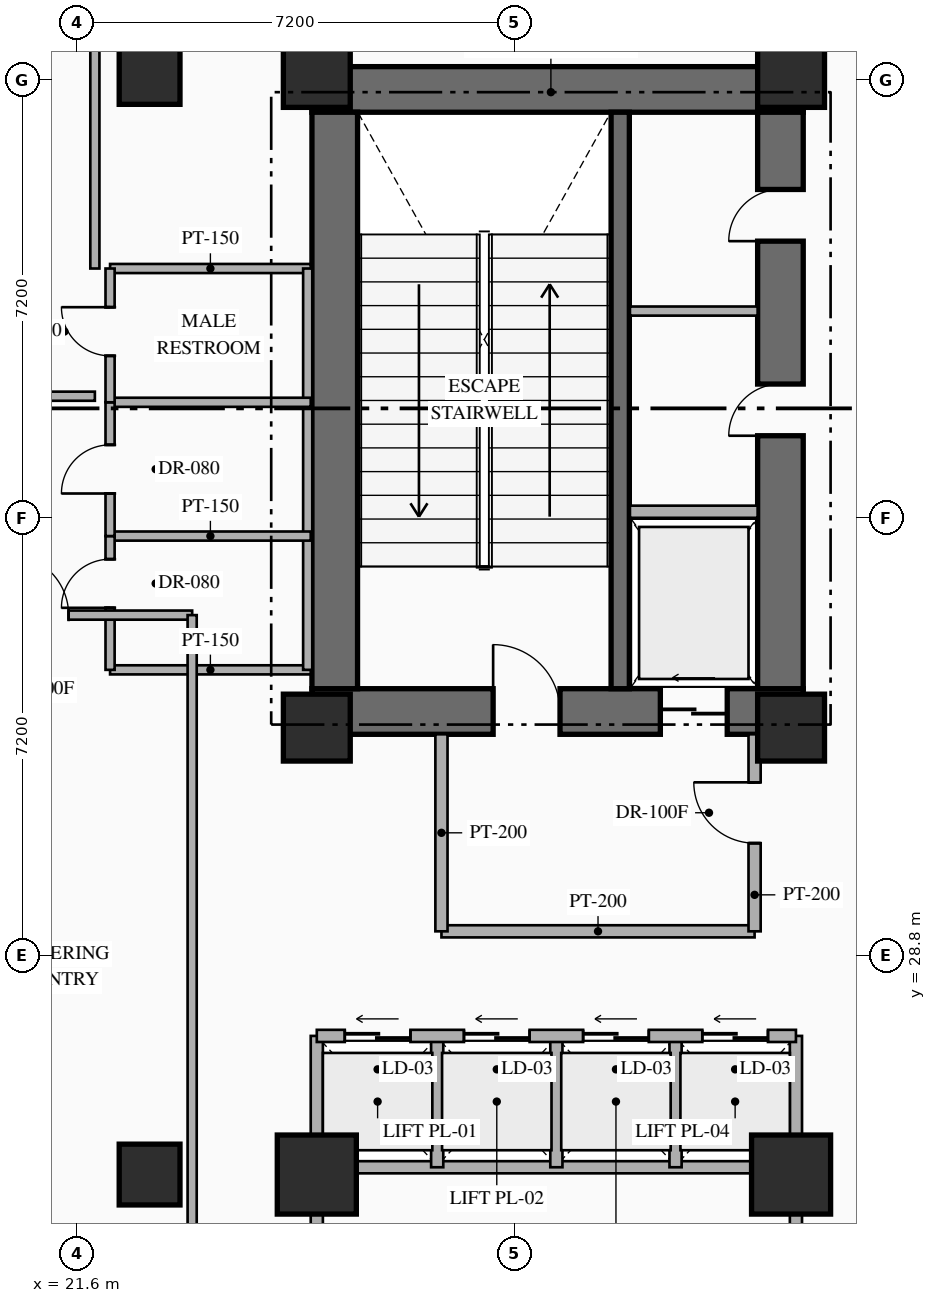
"""IFC4 building model, lengths in metres.
Left out: names, types, materials, properties, quantities, classifications, styles, units other than length and angle.
Written with IfcOpenShell. Run it as: python <this file> out.ifc"""

import sys

from ifc_helpers import new_model, si_unit, direction, frame, frame_2d, origin, origin_2d, place, context, subcontext, project, spatial, rectangle, hollow_rectangle, extrude, element, fill, save


model = new_model("IFC4")
c1 = context("Model", 3, precision=1e-05, world=origin(), true_north=direction((0.0, 1.0)))
c2 = subcontext(c1, "Body", "Model", "MODEL_VIEW")
j1 = project(units=[si_unit("LENGTHUNIT", "METRE"), si_unit("PLANEANGLEUNIT", "RADIAN")], contexts=[c1])
p1 = place(None, origin())
s1 = spatial("IfcSite", under=j1, at=p1, CompositionType="ELEMENT")
p2 = place(p1, origin())
s2 = spatial("IfcBuilding", under=s1, at=p2, CompositionType="ELEMENT")
p3 = place(p2, frame((0.0, 0.0, 5.4)))
s3 = spatial("IfcBuildingStorey", under=s2, at=p3, CompositionType="ELEMENT", Elevation=5.4)
p4 = place(p3, frame((25.47, 32.815, 0.0), z_axis=(0.0, 0.0, 1.0), x_axis=(1.0, 0.0, 0.0)))
e1 = element("IfcWall", 1, at=p4, inside=s3, PredefinedType="SHEAR", context=c2, shape_type="SweptSolid", body=[
    extrude(rectangle(XDim=8.08, YDim=0.75, at=frame_2d((4.04, 0.0))), origin(), (0.0, 0.0, 1.0), 5.4),
])
p5 = place(p4, frame((2.98, 0.0, 0.0)))
e2 = element("IfcOpeningElement", 2, at=p5, cuts=e1, PredefinedType="OPENING", context=c2, shape_type="SweptSolid", body=[
    extrude(rectangle(XDim=1.1, YDim=2.2, at=frame_2d((0.55, 1.1))), frame((0.0, 0.385, 0.0), z_axis=(0.0, -1.0, 0.0), x_axis=(1.0, 0.0, 0.0)), (0.0, 0.0, 1.0), 0.77),
])
p6 = place(p4, frame((5.73, 0.0, 0.0)))
e3 = element("IfcOpeningElement", 3, at=p6, cuts=e1, PredefinedType="OPENING", context=c2, shape_type="SweptSolid", body=[
    extrude(rectangle(XDim=1.1, YDim=2.15, at=frame_2d((0.55, 1.075))), frame((0.0, 0.385, 0.0), z_axis=(0.0, -1.0, 0.0), x_axis=(1.0, 0.0, 0.0)), (0.0, 0.0, 1.0), 0.77),
])
p7 = place(p3, frame((25.47, 43.045, 0.0), z_axis=(0.0, 0.0, 1.0), x_axis=(1.0, 0.0, 0.0)))
e4 = element("IfcWall", 4, at=p7, inside=s3, PredefinedType="SHEAR", context=c2, shape_type="SweptSolid", body=[
    extrude(rectangle(XDim=8.08, YDim=0.75, at=frame_2d((4.04, 0.0))), origin(), (0.0, 0.0, 1.0), 5.4),
])
p8 = place(p3, frame((25.845, 33.19, 0.0), z_axis=(0.0, 0.0, 1.0), x_axis=(0.0, 1.0, 0.0)))
e5 = element("IfcWall", 5, at=p8, inside=s3, PredefinedType="SHEAR", context=c2, shape_type="SweptSolid", body=[
    extrude(rectangle(XDim=9.48, YDim=0.75, at=frame_2d((4.74, 0.0))), origin(), (0.0, 0.0, 1.0), 5.4),
])
p9 = place(p3, frame((33.175, 33.19, 0.0), z_axis=(0.0, 0.0, 1.0), x_axis=(0.0, 1.0, 0.0)))
e6 = element("IfcWall", 6, at=p9, inside=s3, PredefinedType="SHEAR", context=c2, shape_type="SweptSolid", body=[
    extrude(rectangle(XDim=9.48, YDim=0.75, at=frame_2d((4.74, 0.0))), origin(), (0.0, 0.0, 1.0), 5.4),
])
p10 = place(p9, frame((4.16, 0.0, 0.0)))
e7 = element("IfcOpeningElement", 7, at=p10, cuts=e6, PredefinedType="OPENING", context=c2, shape_type="SweptSolid", body=[
    extrude(rectangle(XDim=0.85, YDim=2.08, at=frame_2d((0.425, 1.04))), frame((0.0, 0.385, 0.0), z_axis=(0.0, -1.0, 0.0), x_axis=(1.0, 0.0, 0.0)), (0.0, 0.0, 1.0), 0.77),
])
p11 = place(p9, frame((7.36, 0.0, 0.0)))
e8 = element("IfcOpeningElement", 8, at=p11, cuts=e6, PredefinedType="OPENING", context=c2, shape_type="SweptSolid", body=[
    extrude(rectangle(XDim=0.85, YDim=2.08, at=frame_2d((0.425, 1.04))), frame((0.0, 0.385, 0.0), z_axis=(0.0, -1.0, 0.0), x_axis=(1.0, 0.0, 0.0)), (0.0, 0.0, 1.0), 0.77),
])
p12 = place(p3, frame((30.54, 33.19, 0.0), z_axis=(0.0, 0.0, 1.0), x_axis=(0.0, 1.0, 0.0)))
e9 = element("IfcWall", 9, at=p12, inside=s3, PredefinedType="SHEAR", context=c2, shape_type="SweptSolid", body=[
    extrude(rectangle(XDim=9.48, YDim=0.3, at=frame_2d((4.74, 0.0))), origin(), (0.0, 0.0, 1.0), 5.4),
])
for number, where, z_axis, x_axis in (
    (10, (25.55, 32.55, 0.0), (0.0, 0.0, 1.0), (1.0, 0.0, 0.0)),
    (11, (33.35, 32.55, 0.0), (0.0, 0.0, 1.0), (1.0, 0.0, 0.0)),
    (12, (25.55, 43.3, 0.0), (0.0, 0.0, 1.0), (1.0, 0.0, 0.0)),
    (13, (33.35, 43.3, 0.0), (0.0, 0.0, 1.0), (1.0, 0.0, 0.0)),
):
    element("IfcColumn", number, at=place(p3, frame(where, z_axis=z_axis, x_axis=x_axis)), inside=s3, PredefinedType="COLUMN", context=c2, shape_type="SweptSolid", body=[
        extrude(rectangle(XDim=1.1, YDim=1.1, at=origin_2d()), origin(), (0.0, 0.0, 1.0), 5.4),
    ])
for number, where, z_axis, x_axis in (
    (14, (25.55, 25.2, 0.0), (0.0, 0.0, 1.0), (1.0, 0.0, 0.0)),
    (15, (33.35, 25.2, 0.0), (0.0, 0.0, 1.0), (1.0, 0.0, 0.0)),
):
    element("IfcColumn", number, at=place(p3, frame(where, z_axis=z_axis, x_axis=x_axis)), inside=s3, PredefinedType="COLUMN", context=c2, shape_type="SweptSolid", body=[
        extrude(rectangle(XDim=1.3, YDim=1.3, at=origin_2d()), origin(), (0.0, 0.0, 1.0), 5.4),
    ])
for number, where, z_axis, x_axis in (
    (16, (22.8, 25.2, 0.0), (0.0, 0.0, 1.0), (1.0, 0.0, 0.0)),
    (17, (22.8, 43.3, 0.0), (0.0, 0.0, 1.0), (1.0, 0.0, 0.0)),
):
    element("IfcColumn", number, at=place(p3, frame(where, z_axis=z_axis, x_axis=x_axis)), inside=s3, PredefinedType="COLUMN", context=c2, shape_type="SweptSolid", body=[
        extrude(hollow_rectangle(XDim=1.0, YDim=1.0, WallThickness=0.038, at=origin_2d()), origin(), (0.0, 0.0, 1.0), 5.4),
    ])
p13 = place(p3, frame((30.7, 36.1, 0.0), z_axis=(0.0, 0.0, 1.0), x_axis=(1.0, 0.0, 0.0)))
e18 = element("IfcWall", 18, at=p13, inside=s3, PredefinedType="STANDARD", context=c2, shape_type="SweptSolid", body=[
    extrude(rectangle(XDim=2.1, YDim=0.2, at=frame_2d((1.05, 0.0))), origin(), (0.0, 0.0, 1.0), 5.1),
])
p14 = place(p3, frame((30.7, 39.4, 0.0), z_axis=(0.0, 0.0, 1.0), x_axis=(1.0, 0.0, 0.0)))
e19 = element("IfcWall", 19, at=p14, inside=s3, PredefinedType="PARTITIONING", context=c2, shape_type="SweptSolid", body=[
    extrude(rectangle(XDim=2.1, YDim=0.15, at=frame_2d((1.05, 0.0))), origin(), (0.0, 0.0, 1.0), 5.1),
])
p15 = place(p3, frame((27.6, 29.2, 0.0), z_axis=(0.0, 0.0, 1.0), x_axis=(1.0, 0.0, 0.0)))
e20 = element("IfcWall", 20, at=p15, inside=s3, PredefinedType="STANDARD", context=c2, shape_type="SweptSolid", body=[
    extrude(rectangle(XDim=5.15, YDim=0.2, at=frame_2d((2.575, 0.0))), origin(), (0.0, 0.0, 1.0), 5.1),
])
p16 = place(p3, frame((27.6, 29.2, 0.0), z_axis=(0.0, 0.0, 1.0), x_axis=(0.0, 1.0, 0.0)))
e21 = element("IfcWall", 21, at=p16, inside=s3, PredefinedType="STANDARD", context=c2, shape_type="SweptSolid", body=[
    extrude(rectangle(XDim=3.24, YDim=0.2, at=frame_2d((1.62, 0.0))), origin(), (0.0, 0.0, 1.0), 5.1),
])
p17 = place(p3, frame((32.75, 29.2, 0.0), z_axis=(0.0, 0.0, 1.0), x_axis=(0.0, 1.0, 0.0)))
e22 = element("IfcWall", 22, at=p17, inside=s3, PredefinedType="STANDARD", context=c2, shape_type="SweptSolid", body=[
    extrude(rectangle(XDim=3.24, YDim=0.2, at=frame_2d((1.62, 0.0))), origin(), (0.0, 0.0, 1.0), 5.1),
])
p18 = place(p17, frame((1.45, 0.0, 0.0)))
e23 = element("IfcOpeningElement", 23, at=p18, cuts=e22, PredefinedType="OPENING", context=c2, shape_type="SweptSolid", body=[
    extrude(rectangle(XDim=1.0, YDim=2.2, at=frame_2d((0.5, 1.1))), frame((0.0, 0.11, 0.0), z_axis=(0.0, -1.0, 0.0), x_axis=(1.0, 0.0, 0.0)), (0.0, 0.0, 1.0), 0.22),
])
for number, where, z_axis, x_axis in (
    (24, (25.55, 23.4, 0.0), (0.0, 0.0, 1.0), (0.0, 1.0, 0.0)),
    (25, (33.43, 23.4, 0.0), (0.0, 0.0, 1.0), (0.0, 1.0, 0.0)),
):
    element("IfcWall", number, at=place(p3, frame(where, z_axis=z_axis, x_axis=x_axis)), inside=s3, PredefinedType="STANDARD", context=c2, shape_type="SweptSolid", body=[
        extrude(rectangle(XDim=4.08, YDim=0.2, at=frame_2d((2.04, 0.0))), origin(), (0.0, 0.0, 1.0), 3.895),
    ])
p19 = place(p3, frame((25.55, 25.32, 0.0), z_axis=(0.0, 0.0, 1.0), x_axis=(1.0, 0.0, 0.0)))
e26 = element("IfcWall", 26, at=p19, inside=s3, PredefinedType="STANDARD", context=c2, shape_type="SweptSolid", body=[
    extrude(rectangle(XDim=7.88, YDim=0.2, at=frame_2d((3.94, 0.0))), origin(), (0.0, 0.0, 1.0), 4.495),
])
for number, where, z_axis, x_axis in (
    (27, (27.53, 25.32, 0.0), (0.0, 0.0, 1.0), (0.0, 1.0, 0.0)),
    (28, (29.49, 25.32, 0.0), (0.0, 0.0, 1.0), (0.0, 1.0, 0.0)),
    (29, (31.45, 25.32, 0.0), (0.0, 0.0, 1.0), (0.0, 1.0, 0.0)),
):
    element("IfcWall", number, at=place(p3, frame(where, z_axis=z_axis, x_axis=x_axis)), inside=s3, PredefinedType="STANDARD", context=c2, shape_type="SweptSolid", body=[
        extrude(rectangle(XDim=2.16, YDim=0.2, at=frame_2d((1.08, 0.0))), origin(), (0.0, 0.0, 1.0), 5.1),
    ])
p20 = place(p3, frame((25.55, 27.48, 0.0), z_axis=(0.0, 0.0, 1.0), x_axis=(1.0, 0.0, 0.0)))
e30 = element("IfcWall", 30, at=p20, inside=s3, PredefinedType="STANDARD", context=c2, shape_type="SweptSolid", body=[
    extrude(rectangle(XDim=7.88, YDim=0.2, at=frame_2d((3.94, 0.0))), origin(), (0.0, 0.0, 1.0), 5.1),
])
p21 = place(p20, frame((0.46, 0.0, 0.0)))
e31 = element("IfcOpeningElement", 31, at=p21, cuts=e30, PredefinedType="OPENING", context=c2, shape_type="SweptSolid", body=[
    extrude(rectangle(XDim=1.08, YDim=2.15, at=frame_2d((0.54, 1.075))), frame((0.0, 0.11, 0.0), z_axis=(0.0, -1.0, 0.0), x_axis=(1.0, 0.0, 0.0)), (0.0, 0.0, 1.0), 0.22),
])
p22 = place(p20, frame((2.42, 0.0, 0.0)))
e32 = element("IfcOpeningElement", 32, at=p22, cuts=e30, PredefinedType="OPENING", context=c2, shape_type="SweptSolid", body=[
    extrude(rectangle(XDim=1.08, YDim=2.15, at=frame_2d((0.54, 1.075))), frame((0.0, 0.11, 0.0), z_axis=(0.0, -1.0, 0.0), x_axis=(1.0, 0.0, 0.0)), (0.0, 0.0, 1.0), 0.22),
])
p23 = place(p20, frame((4.38, 0.0, 0.0)))
e33 = element("IfcOpeningElement", 33, at=p23, cuts=e30, PredefinedType="OPENING", context=c2, shape_type="SweptSolid", body=[
    extrude(rectangle(XDim=1.08, YDim=2.15, at=frame_2d((0.54, 1.075))), frame((0.0, 0.11, 0.0), z_axis=(0.0, -1.0, 0.0), x_axis=(1.0, 0.0, 0.0)), (0.0, 0.0, 1.0), 0.22),
])
p24 = place(p20, frame((6.34, 0.0, 0.0)))
e34 = element("IfcOpeningElement", 34, at=p24, cuts=e30, PredefinedType="OPENING", context=c2, shape_type="SweptSolid", body=[
    extrude(rectangle(XDim=1.08, YDim=2.15, at=frame_2d((0.54, 1.075))), frame((0.0, 0.11, 0.0), z_axis=(0.0, -1.0, 0.0), x_axis=(1.0, 0.0, 0.0)), (0.0, 0.0, 1.0), 0.22),
])
for number, where, z_axis, x_axis in (
    (35, (22.15, 33.5, 0.0), (0.0, 0.0, 1.0), (1.0, 0.0, 0.0)),
    (36, (22.15, 40.1, 0.0), (0.0, 0.0, 1.0), (1.0, 0.0, 0.0)),
):
    element("IfcWall", number, at=place(p3, frame(where, z_axis=z_axis, x_axis=x_axis)), inside=s3, PredefinedType="PARTITIONING", context=c2, shape_type="SweptSolid", body=[
        extrude(rectangle(XDim=3.3, YDim=0.15, at=frame_2d((1.65, 0.0))), origin(), (0.0, 0.0, 1.0), 5.1),
    ])
p25 = place(p3, frame((25.4, 33.5, 0.0), z_axis=(0.0, 0.0, 1.0), x_axis=(0.0, 1.0, 0.0)))
e37 = element("IfcWall", 37, at=p25, inside=s3, PredefinedType="PARTITIONING", context=c2, shape_type="SweptSolid", body=[
    extrude(rectangle(XDim=6.6, YDim=0.15, at=frame_2d((3.3, 0.0))), origin(), (0.0, 0.0, 1.0), 5.1),
])
for number, where, z_axis, x_axis in (
    (38, (22.15, 35.7, 0.0), (0.0, 0.0, 1.0), (1.0, 0.0, 0.0)),
    (39, (22.15, 37.9, 0.0), (0.0, 0.0, 1.0), (1.0, 0.0, 0.0)),
):
    element("IfcWall", number, at=place(p3, frame(where, z_axis=z_axis, x_axis=x_axis)), inside=s3, PredefinedType="PARTITIONING", context=c2, shape_type="SweptSolid", body=[
        extrude(rectangle(XDim=3.3, YDim=0.15, at=frame_2d((1.65, 0.0))), origin(), (0.0, 0.0, 1.0), 5.1),
    ])
p26 = place(p3, frame((22.15, 33.5, 0.0), z_axis=(0.0, 0.0, 1.0), x_axis=(0.0, 1.0, 0.0)))
e40 = element("IfcWall", 40, at=p26, inside=s3, PredefinedType="PARTITIONING", context=c2, shape_type="SweptSolid", body=[
    extrude(rectangle(XDim=2.2, YDim=0.15, at=frame_2d((1.1, 0.0))), origin(), (0.0, 0.0, 1.0), 5.1),
])
p27 = place(p26, frame((1.02, 0.0, 0.0)))
e41 = element("IfcOpeningElement", 41, at=p27, cuts=e40, PredefinedType="OPENING", context=c2, shape_type="SweptSolid", body=[
    extrude(rectangle(XDim=0.8, YDim=2.06, at=frame_2d((0.4, 1.03))), frame((0.0, 0.085, 0.0), z_axis=(0.0, -1.0, 0.0), x_axis=(1.0, 0.0, 0.0)), (0.0, 0.0, 1.0), 0.17),
])
p28 = place(p3, frame((22.15, 35.7, 0.0), z_axis=(0.0, 0.0, 1.0), x_axis=(0.0, 1.0, 0.0)))
e42 = element("IfcWall", 42, at=p28, inside=s3, PredefinedType="PARTITIONING", context=c2, shape_type="SweptSolid", body=[
    extrude(rectangle(XDim=2.2, YDim=0.15, at=frame_2d((1.1, 0.0))), origin(), (0.0, 0.0, 1.0), 5.1),
])
p29 = place(p28, frame((0.7, 0.0, 0.0)))
e43 = element("IfcOpeningElement", 43, at=p29, cuts=e42, PredefinedType="OPENING", context=c2, shape_type="SweptSolid", body=[
    extrude(rectangle(XDim=0.8, YDim=2.06, at=frame_2d((0.4, 1.03))), frame((0.0, 0.085, 0.0), z_axis=(0.0, -1.0, 0.0), x_axis=(1.0, 0.0, 0.0)), (0.0, 0.0, 1.0), 0.17),
])
p30 = place(p3, frame((22.15, 37.9, 0.0), z_axis=(0.0, 0.0, 1.0), x_axis=(0.0, 1.0, 0.0)))
e44 = element("IfcWall", 44, at=p30, inside=s3, PredefinedType="PARTITIONING", context=c2, shape_type="SweptSolid", body=[
    extrude(rectangle(XDim=2.2, YDim=0.15, at=frame_2d((1.1, 0.0))), origin(), (0.0, 0.0, 1.0), 5.1),
])
p31 = place(p30, frame((0.764, 0.0, 0.0)))
e45 = element("IfcOpeningElement", 45, at=p31, cuts=e44, PredefinedType="OPENING", context=c2, shape_type="SweptSolid", body=[
    extrude(rectangle(XDim=0.8, YDim=2.06, at=frame_2d((0.4, 1.03))), frame((0.0, 0.085, 0.0), z_axis=(0.0, -1.0, 0.0), x_axis=(1.0, 0.0, 0.0)), (0.0, 0.0, 1.0), 0.17),
])
p32 = place(p3, frame((0.04, 38.0, 0.0), z_axis=(0.0, 0.0, 1.0), x_axis=(1.0, 0.0, 0.0)))
e46 = element("IfcWall", 46, at=p32, inside=s3, PredefinedType="PARTITIONING", context=c2, shape_type="SweptSolid", body=[
    extrude(rectangle(XDim=21.86, YDim=0.15, at=frame_2d((10.93, 0.0))), origin(), (0.0, 0.0, 1.0), 5.1),
])
p33 = place(p32, frame((10.03, 0.0, 0.0)))
e47 = element("IfcOpeningElement", 47, at=p33, cuts=e46, PredefinedType="OPENING", context=c2, shape_type="SweptSolid", body=[
    extrude(rectangle(XDim=1.8, YDim=2.35, at=frame_2d((0.9, 1.175))), frame((0.0, 0.085, 0.0), z_axis=(0.0, -1.0, 0.0), x_axis=(1.0, 0.0, 0.0)), (0.0, 0.0, 1.0), 0.17),
])
p34 = place(p3, frame((21.9, 40.1, 0.0), z_axis=(0.0, 0.0, 1.0), x_axis=(0.0, 1.0, 0.0)))
e48 = element("IfcWall", 48, at=p34, inside=s3, PredefinedType="PARTITIONING", context=c2, shape_type="SweptSolid", body=[
    extrude(rectangle(XDim=11.46, YDim=0.15, at=frame_2d((5.73, 0.0))), origin(), (0.0, 0.0, 1.0), 5.1),
])
p35 = place(p3, frame((19.2, 34.4, 0.0), z_axis=(0.0, 0.0, 1.0), x_axis=(1.0, 0.0, 0.0)))
e49 = element("IfcWall", 49, at=p35, inside=s3, PredefinedType="PARTITIONING", context=c2, shape_type="SweptSolid", body=[
    extrude(rectangle(XDim=4.3, YDim=0.15, at=frame_2d((2.15, 0.0))), origin(), (0.0, 0.0, 1.0), 5.1),
])
p36 = place(p35, frame((1.269, 0.0, 0.0)))
e50 = element("IfcOpeningElement", 50, at=p36, cuts=e49, PredefinedType="OPENING", context=c2, shape_type="SweptSolid", body=[
    extrude(rectangle(XDim=1.0, YDim=2.2, at=frame_2d((0.5, 1.1))), frame((0.0, 0.085, 0.0), z_axis=(0.0, -1.0, 0.0), x_axis=(1.0, 0.0, 0.0)), (0.0, 0.0, 1.0), 0.17),
])
p37 = place(p3, frame((23.5, 23.44, 0.0), z_axis=(0.0, 0.0, 1.0), x_axis=(0.0, 1.0, 0.0)))
e51 = element("IfcWall", 51, at=p37, inside=s3, PredefinedType="PARTITIONING", context=c2, shape_type="SweptSolid", body=[
    extrude(rectangle(XDim=10.96, YDim=0.15, at=frame_2d((5.48, 0.0))), origin(), (0.0, 0.0, 1.0), 5.1),
])
p38 = place(p3, frame((33.384, 17.312, 0.0), z_axis=(0.0, 0.0, 1.0), x_axis=(0.600008743659, 0.799993442181, 0.0)))
e52 = element("IfcWall", 52, at=p38, inside=s3, PredefinedType="PARTITIONING", context=c2, shape_type="SweptSolid", body=[
    extrude(rectangle(XDim=8.935, YDim=0.15, at=frame_2d((4.468, 0.0))), origin(), (0.0, 0.0, 1.0), 5.1),
])
p39 = place(p5, origin())
e53 = element("IfcDoor", 53, at=p39, inside=s3, OperationType="SINGLE_SWING_LEFT", PredefinedType="DOOR", context=c2, shape_type="SweptSolid", body=[
    extrude(rectangle(XDim=1.1, YDim=2.2, at=frame_2d((0.55, 1.1))), frame((0.0, 0.025, 0.0), z_axis=(0.0, -1.0, 0.0), x_axis=(1.0, 0.0, 0.0)), (0.0, 0.0, 1.0), 0.05),
])
fill(e2, e53)
p40 = place(p6, origin())
e54 = element("IfcDoor", 54, at=p40, inside=s3, OperationType="SLIDING_TO_LEFT", PredefinedType="USERDEFINED", context=c2, shape_type="SweptSolid", body=[
    extrude(rectangle(XDim=1.1, YDim=2.15, at=frame_2d((0.55, 1.075))), frame((0.0, 0.025, 0.0), z_axis=(0.0, -1.0, 0.0), x_axis=(1.0, 0.0, 0.0)), (0.0, 0.0, 1.0), 0.05),
])
fill(e3, e54)
p41 = place(p10, origin())
e55 = element("IfcDoor", 55, at=p41, inside=s3, OperationType="SINGLE_SWING_LEFT", PredefinedType="DOOR", context=c2, shape_type="SweptSolid", body=[
    extrude(rectangle(XDim=0.85, YDim=2.08, at=frame_2d((0.425, 1.04))), frame((0.0, 0.025, 0.0), z_axis=(0.0, -1.0, 0.0), x_axis=(1.0, 0.0, 0.0)), (0.0, 0.0, 1.0), 0.05),
])
fill(e7, e55)
p42 = place(p11, origin())
e56 = element("IfcDoor", 56, at=p42, inside=s3, OperationType="SINGLE_SWING_LEFT", PredefinedType="DOOR", context=c2, shape_type="SweptSolid", body=[
    extrude(rectangle(XDim=0.85, YDim=2.08, at=frame_2d((0.425, 1.04))), frame((0.0, 0.025, 0.0), z_axis=(0.0, -1.0, 0.0), x_axis=(1.0, 0.0, 0.0)), (0.0, 0.0, 1.0), 0.05),
])
fill(e8, e56)
p43 = place(p18, origin())
e57 = element("IfcDoor", 57, at=p43, inside=s3, OperationType="SINGLE_SWING_RIGHT", PredefinedType="DOOR", context=c2, shape_type="SweptSolid", body=[
    extrude(rectangle(XDim=1.0, YDim=2.2, at=frame_2d((0.5, 1.1))), frame((0.0, 0.025, 0.0), z_axis=(0.0, -1.0, 0.0), x_axis=(1.0, 0.0, 0.0)), (0.0, 0.0, 1.0), 0.05),
])
fill(e23, e57)
p44 = place(p21, origin())
e58 = element("IfcDoor", 58, at=p44, inside=s3, OperationType="SLIDING_TO_LEFT", PredefinedType="USERDEFINED", context=c2, shape_type="SweptSolid", body=[
    extrude(rectangle(XDim=1.08, YDim=2.15, at=frame_2d((0.54, 1.075))), frame((0.0, 0.025, 0.0), z_axis=(0.0, -1.0, 0.0), x_axis=(1.0, 0.0, 0.0)), (0.0, 0.0, 1.0), 0.05),
])
fill(e31, e58)
p45 = place(p22, origin())
e59 = element("IfcDoor", 59, at=p45, inside=s3, OperationType="SLIDING_TO_LEFT", PredefinedType="USERDEFINED", context=c2, shape_type="SweptSolid", body=[
    extrude(rectangle(XDim=1.08, YDim=2.15, at=frame_2d((0.54, 1.075))), frame((0.0, 0.025, 0.0), z_axis=(0.0, -1.0, 0.0), x_axis=(1.0, 0.0, 0.0)), (0.0, 0.0, 1.0), 0.05),
])
fill(e32, e59)
p46 = place(p23, origin())
e60 = element("IfcDoor", 60, at=p46, inside=s3, OperationType="SLIDING_TO_LEFT", PredefinedType="USERDEFINED", context=c2, shape_type="SweptSolid", body=[
    extrude(rectangle(XDim=1.08, YDim=2.15, at=frame_2d((0.54, 1.075))), frame((0.0, 0.025, 0.0), z_axis=(0.0, -1.0, 0.0), x_axis=(1.0, 0.0, 0.0)), (0.0, 0.0, 1.0), 0.05),
])
fill(e33, e60)
p47 = place(p24, origin())
e61 = element("IfcDoor", 61, at=p47, inside=s3, OperationType="SLIDING_TO_LEFT", PredefinedType="USERDEFINED", context=c2, shape_type="SweptSolid", body=[
    extrude(rectangle(XDim=1.08, YDim=2.15, at=frame_2d((0.54, 1.075))), frame((0.0, 0.025, 0.0), z_axis=(0.0, -1.0, 0.0), x_axis=(1.0, 0.0, 0.0)), (0.0, 0.0, 1.0), 0.05),
])
fill(e34, e61)
p48 = place(p27, origin())
e62 = element("IfcDoor", 62, at=p48, inside=s3, OperationType="SINGLE_SWING_LEFT", PredefinedType="DOOR", context=c2, shape_type="SweptSolid", body=[
    extrude(rectangle(XDim=0.8, YDim=2.06, at=frame_2d((0.4, 1.03))), frame((0.0, 0.025, 0.0), z_axis=(0.0, -1.0, 0.0), x_axis=(1.0, 0.0, 0.0)), (0.0, 0.0, 1.0), 0.05),
])
fill(e41, e62)
p49 = place(p29, origin())
e63 = element("IfcDoor", 63, at=p49, inside=s3, OperationType="SINGLE_SWING_LEFT", PredefinedType="DOOR", context=c2, shape_type="SweptSolid", body=[
    extrude(rectangle(XDim=0.8, YDim=2.06, at=frame_2d((0.4, 1.03))), frame((0.0, 0.025, 0.0), z_axis=(0.0, -1.0, 0.0), x_axis=(1.0, 0.0, 0.0)), (0.0, 0.0, 1.0), 0.05),
])
fill(e43, e63)
p50 = place(p31, origin())
e64 = element("IfcDoor", 64, at=p50, inside=s3, OperationType="SINGLE_SWING_RIGHT", PredefinedType="DOOR", context=c2, shape_type="SweptSolid", body=[
    extrude(rectangle(XDim=0.8, YDim=2.06, at=frame_2d((0.4, 1.03))), frame((0.0, 0.025, 0.0), z_axis=(0.0, -1.0, 0.0), x_axis=(1.0, 0.0, 0.0)), (0.0, 0.0, 1.0), 0.05),
])
fill(e45, e64)
p51 = place(p36, origin())
e65 = element("IfcDoor", 65, at=p51, inside=s3, OperationType="SINGLE_SWING_LEFT", PredefinedType="DOOR", context=c2, shape_type="SweptSolid", body=[
    extrude(rectangle(XDim=1.0, YDim=2.2, at=frame_2d((0.5, 1.1))), frame((0.0, 0.025, 0.0), z_axis=(0.0, -1.0, 0.0), x_axis=(1.0, 0.0, 0.0)), (0.0, 0.0, 1.0), 0.05),
])
fill(e50, e65)
save(model, sys.argv[1])
